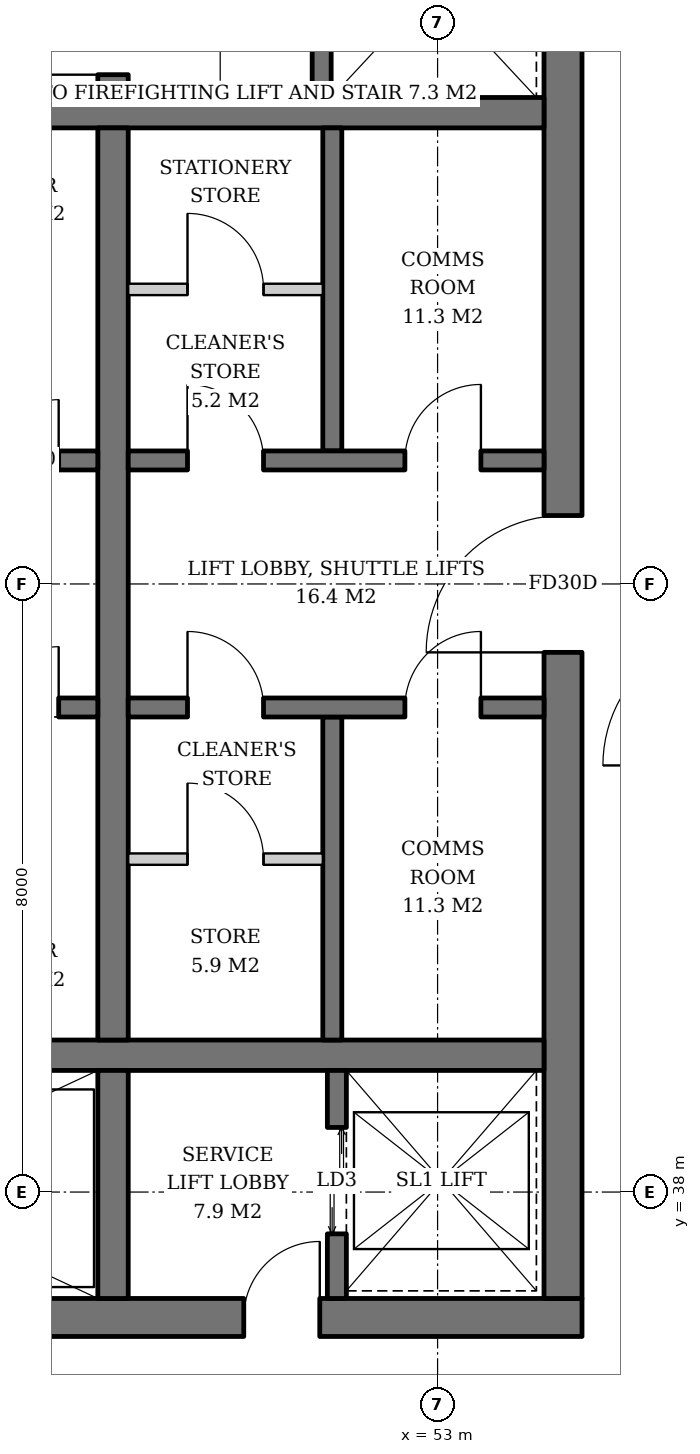
"""IFC4 building model, lengths in metres.
Left out: names, types, materials, properties, quantities, classifications, styles, units other than length and angle.
Written with IfcOpenShell. Run it as: python <this file> out.ifc"""

import sys

from ifc_helpers import new_model, si_unit, direction, frame, frame_2d, origin, place, context, subcontext, project, spatial, rectangle, extrude, element, fill, save


model = new_model("IFC4")
c1 = context("Model", 3, precision=1e-05, world=origin(), true_north=direction((0.0, 1.0)))
c2 = subcontext(c1, "Body", "Model", "MODEL_VIEW")
j1 = project(units=[si_unit("LENGTHUNIT", "METRE"), si_unit("PLANEANGLEUNIT", "RADIAN")], contexts=[c1])
p1 = place(None, origin())
s1 = spatial("IfcSite", under=j1, at=p1, CompositionType="ELEMENT")
p2 = place(p1, origin())
s2 = spatial("IfcBuilding", under=s1, at=p2, CompositionType="ELEMENT")
p3 = place(p2, frame((0.0, 0.0, 283.2)))
s3 = spatial("IfcBuildingStorey", under=s2, at=p3, CompositionType="ELEMENT", Elevation=283.2)
p4 = place(p3, frame((35.1, 36.35, 0.0), z_axis=(0.0, 0.0, 1.0), x_axis=(1.0, 0.0, 0.0)))
e1 = element("IfcWall", 1, at=p4, inside=s3, PredefinedType="SHEAR", context=c2, shape_type="SweptSolid", body=[
    extrude(rectangle(XDim=19.8, YDim=0.5, at=frame_2d((9.9, 0.0))), origin(), (0.0, 0.0, 1.0), 3.8),
])
p5 = place(p4, frame((3.9, 0.0, 0.0)))
e2 = element("IfcOpeningElement", 2, at=p5, cuts=e1, PredefinedType="OPENING", context=c2, shape_type="SweptSolid", body=[
    extrude(rectangle(XDim=1.0, YDim=2.1, at=frame_2d((0.5, 1.05))), frame((0.0, 0.26, 0.0), z_axis=(0.0, -1.0, 0.0), x_axis=(1.0, 0.0, 0.0)), (0.0, 0.0, 1.0), 0.52),
])
p6 = place(p4, frame((15.35, 0.0, 0.0)))
e3 = element("IfcOpeningElement", 3, at=p6, cuts=e1, PredefinedType="OPENING", context=c2, shape_type="SweptSolid", body=[
    extrude(rectangle(XDim=1.0, YDim=2.1, at=frame_2d((0.5, 1.05))), frame((0.0, 0.26, 0.0), z_axis=(0.0, -1.0, 0.0), x_axis=(1.0, 0.0, 0.0)), (0.0, 0.0, 1.0), 0.52),
])
p7 = place(p3, frame((54.65, 36.6, 0.0), z_axis=(0.0, 0.0, 1.0), x_axis=(0.0, 1.0, 0.0)))
e4 = element("IfcWall", 4, at=p7, inside=s3, PredefinedType="SHEAR", context=c2, shape_type="SweptSolid", body=[
    extrude(rectangle(XDim=18.8, YDim=0.5, at=frame_2d((9.4, 0.0))), origin(), (0.0, 0.0, 1.0), 3.8),
])
p8 = place(p7, frame((8.5, 0.0, 0.0)))
e5 = element("IfcOpeningElement", 5, at=p8, cuts=e4, PredefinedType="OPENING", context=c2, shape_type="SweptSolid", body=[
    extrude(rectangle(XDim=1.8, YDim=2.4, at=frame_2d((0.9, 1.2))), frame((0.0, 0.26, 0.0), z_axis=(0.0, -1.0, 0.0), x_axis=(1.0, 0.0, 0.0)), (0.0, 0.0, 1.0), 0.52),
])
for number, where, z_axis, x_axis in (
    (6, (35.6, 39.8, 0.0), (0.0, 0.0, 1.0), (1.0, 0.0, 0.0)),
    (7, (35.6, 52.2, 0.0), (0.0, 0.0, 1.0), (1.0, 0.0, 0.0)),
):
    element("IfcWall", number, at=place(p3, frame(where, z_axis=z_axis, x_axis=x_axis)), inside=s3, PredefinedType="SHEAR", context=c2, shape_type="SweptSolid", body=[
        extrude(rectangle(XDim=18.8, YDim=0.4, at=frame_2d((9.4, 0.0))), origin(), (0.0, 0.0, 1.0), 3.8),
    ])
p9 = place(p3, frame((48.73, 36.6, 0.0), z_axis=(0.0, 0.0, 1.0), x_axis=(0.0, 1.0, 0.0)))
e8 = element("IfcWall", 8, at=p9, inside=s3, PredefinedType="SHEAR", context=c2, shape_type="SweptSolid", body=[
    extrude(rectangle(XDim=3.0, YDim=0.4, at=frame_2d((1.5, 0.0))), origin(), (0.0, 0.0, 1.0), 3.8),
])
p10 = place(p3, frame((48.73, 40.0, 0.0), z_axis=(0.0, 0.0, 1.0), x_axis=(0.0, 1.0, 0.0)))
e9 = element("IfcWall", 9, at=p10, inside=s3, PredefinedType="SHEAR", context=c2, shape_type="SweptSolid", body=[
    extrude(rectangle(XDim=12.0, YDim=0.4, at=frame_2d((6.0, 0.0))), origin(), (0.0, 0.0, 1.0), 3.8),
])
p11 = place(p3, frame((48.73, 52.4, 0.0), z_axis=(0.0, 0.0, 1.0), x_axis=(0.0, 1.0, 0.0)))
e10 = element("IfcWall", 10, at=p11, inside=s3, PredefinedType="SHEAR", context=c2, shape_type="SweptSolid", body=[
    extrude(rectangle(XDim=3.0, YDim=0.4, at=frame_2d((1.5, 0.0))), origin(), (0.0, 0.0, 1.0), 3.8),
])
p12 = place(p11, frame((0.3, 0.0, 0.0)))
e11 = element("IfcOpeningElement", 11, at=p12, cuts=e10, PredefinedType="OPENING", context=c2, shape_type="SweptSolid", body=[
    extrude(rectangle(XDim=1.0, YDim=2.1, at=frame_2d((0.5, 1.05))), frame((0.0, 0.21, 0.0), z_axis=(0.0, -1.0, 0.0), x_axis=(1.0, 0.0, 0.0)), (0.0, 0.0, 1.0), 0.42),
])
p13 = place(p3, frame((51.675, 36.6, 0.0), z_axis=(0.0, 0.0, 1.0), x_axis=(0.0, 1.0, 0.0)))
e12 = element("IfcWall", 12, at=p13, inside=s3, PredefinedType="SHEAR", context=c2, shape_type="SweptSolid", body=[
    extrude(rectangle(XDim=3.0, YDim=0.25, at=frame_2d((1.5, 0.0))), origin(), (0.0, 0.0, 1.0), 3.8),
])
p14 = place(p13, frame((0.85, 0.0, 0.0)))
e13 = element("IfcOpeningElement", 13, at=p14, cuts=e12, PredefinedType="OPENING", context=c2, shape_type="SweptSolid", body=[
    extrude(rectangle(XDim=1.4, YDim=2.4, at=frame_2d((0.7, 1.2))), frame((0.0, 0.135, 0.0), z_axis=(0.0, -1.0, 0.0), x_axis=(1.0, 0.0, 0.0)), (0.0, 0.0, 1.0), 0.27),
])
p15 = place(p3, frame((51.475, 52.4, 0.0), z_axis=(0.0, 0.0, 1.0), x_axis=(0.0, 1.0, 0.0)))
e14 = element("IfcWall", 14, at=p15, inside=s3, PredefinedType="SHEAR", context=c2, shape_type="SweptSolid", body=[
    extrude(rectangle(XDim=3.0, YDim=0.25, at=frame_2d((1.5, 0.0))), origin(), (0.0, 0.0, 1.0), 3.8),
])
p16 = place(p15, frame((0.8, 0.0, 0.0)))
e15 = element("IfcOpeningElement", 15, at=p16, cuts=e14, PredefinedType="OPENING", context=c2, shape_type="SweptSolid", body=[
    extrude(rectangle(XDim=1.3, YDim=2.2, at=frame_2d((0.65, 1.1))), frame((0.0, 0.135, 0.0), z_axis=(0.0, -1.0, 0.0), x_axis=(1.0, 0.0, 0.0)), (0.0, 0.0, 1.0), 0.27),
])
p17 = place(p3, frame((35.6, 47.625, 0.0), z_axis=(0.0, 0.0, 1.0), x_axis=(1.0, 0.0, 0.0)))
e16 = element("IfcWall", 16, at=p17, inside=s3, PredefinedType="SHEAR", context=c2, shape_type="SweptSolid", body=[
    extrude(rectangle(XDim=12.93, YDim=0.25, at=frame_2d((6.465, 0.0))), origin(), (0.0, 0.0, 1.0), 3.8),
])
p18 = place(p17, frame((0.75, 0.0, 0.0)))
e17 = element("IfcOpeningElement", 17, at=p18, cuts=e16, PredefinedType="OPENING", context=c2, shape_type="SweptSolid", body=[
    extrude(rectangle(XDim=1.1, YDim=2.2, at=frame_2d((0.55, 1.1))), frame((0.0, 0.135, 0.0), z_axis=(0.0, -1.0, 0.0), x_axis=(1.0, 0.0, 0.0)), (0.0, 0.0, 1.0), 0.27),
])
p19 = place(p17, frame((3.55, 0.0, 0.0)))
e18 = element("IfcOpeningElement", 18, at=p19, cuts=e16, PredefinedType="OPENING", context=c2, shape_type="SweptSolid", body=[
    extrude(rectangle(XDim=1.1, YDim=2.2, at=frame_2d((0.55, 1.1))), frame((0.0, 0.135, 0.0), z_axis=(0.0, -1.0, 0.0), x_axis=(1.0, 0.0, 0.0)), (0.0, 0.0, 1.0), 0.27),
])
p20 = place(p17, frame((6.3, 0.0, 0.0)))
e19 = element("IfcOpeningElement", 19, at=p20, cuts=e16, PredefinedType="OPENING", context=c2, shape_type="SweptSolid", body=[
    extrude(rectangle(XDim=1.1, YDim=2.2, at=frame_2d((0.55, 1.1))), frame((0.0, 0.135, 0.0), z_axis=(0.0, -1.0, 0.0), x_axis=(1.0, 0.0, 0.0)), (0.0, 0.0, 1.0), 0.27),
])
p21 = place(p17, frame((9.1, 0.0, 0.0)))
e20 = element("IfcOpeningElement", 20, at=p21, cuts=e16, PredefinedType="OPENING", context=c2, shape_type="SweptSolid", body=[
    extrude(rectangle(XDim=1.0, YDim=2.1, at=frame_2d((0.5, 1.05))), frame((0.0, 0.135, 0.0), z_axis=(0.0, -1.0, 0.0), x_axis=(1.0, 0.0, 0.0)), (0.0, 0.0, 1.0), 0.27),
])
p22 = place(p17, frame((11.615, 0.0, 0.0)))
e21 = element("IfcOpeningElement", 21, at=p22, cuts=e16, PredefinedType="OPENING", context=c2, shape_type="SweptSolid", body=[
    extrude(rectangle(XDim=0.8, YDim=2.0, at=frame_2d((0.4, 1.0))), frame((0.0, 0.135, 0.0), z_axis=(0.0, -1.0, 0.0), x_axis=(1.0, 0.0, 0.0)), (0.0, 0.0, 1.0), 0.27),
])
p23 = place(p3, frame((35.6, 44.375, 0.0), z_axis=(0.0, 0.0, 1.0), x_axis=(1.0, 0.0, 0.0)))
e22 = element("IfcWall", 22, at=p23, inside=s3, PredefinedType="SHEAR", context=c2, shape_type="SweptSolid", body=[
    extrude(rectangle(XDim=12.93, YDim=0.25, at=frame_2d((6.465, 0.0))), origin(), (0.0, 0.0, 1.0), 3.8),
])
p24 = place(p23, frame((0.75, 0.0, 0.0)))
e23 = element("IfcOpeningElement", 23, at=p24, cuts=e22, PredefinedType="OPENING", context=c2, shape_type="SweptSolid", body=[
    extrude(rectangle(XDim=1.1, YDim=2.2, at=frame_2d((0.55, 1.1))), frame((0.0, 0.135, 0.0), z_axis=(0.0, -1.0, 0.0), x_axis=(1.0, 0.0, 0.0)), (0.0, 0.0, 1.0), 0.27),
])
p25 = place(p23, frame((3.55, 0.0, 0.0)))
e24 = element("IfcOpeningElement", 24, at=p25, cuts=e22, PredefinedType="OPENING", context=c2, shape_type="SweptSolid", body=[
    extrude(rectangle(XDim=1.1, YDim=2.2, at=frame_2d((0.55, 1.1))), frame((0.0, 0.135, 0.0), z_axis=(0.0, -1.0, 0.0), x_axis=(1.0, 0.0, 0.0)), (0.0, 0.0, 1.0), 0.27),
])
p26 = place(p23, frame((6.3, 0.0, 0.0)))
e25 = element("IfcOpeningElement", 25, at=p26, cuts=e22, PredefinedType="OPENING", context=c2, shape_type="SweptSolid", body=[
    extrude(rectangle(XDim=1.1, YDim=2.2, at=frame_2d((0.55, 1.1))), frame((0.0, 0.135, 0.0), z_axis=(0.0, -1.0, 0.0), x_axis=(1.0, 0.0, 0.0)), (0.0, 0.0, 1.0), 0.27),
])
p27 = place(p23, frame((9.1, 0.0, 0.0)))
e26 = element("IfcOpeningElement", 26, at=p27, cuts=e22, PredefinedType="OPENING", context=c2, shape_type="SweptSolid", body=[
    extrude(rectangle(XDim=1.0, YDim=2.1, at=frame_2d((0.5, 1.05))), frame((0.0, 0.135, 0.0), z_axis=(0.0, -1.0, 0.0), x_axis=(1.0, 0.0, 0.0)), (0.0, 0.0, 1.0), 0.27),
])
p28 = place(p23, frame((11.615, 0.0, 0.0)))
e27 = element("IfcOpeningElement", 27, at=p28, cuts=e22, PredefinedType="OPENING", context=c2, shape_type="SweptSolid", body=[
    extrude(rectangle(XDim=0.8, YDim=2.0, at=frame_2d((0.4, 1.0))), frame((0.0, 0.135, 0.0), z_axis=(0.0, -1.0, 0.0), x_axis=(1.0, 0.0, 0.0)), (0.0, 0.0, 1.0), 0.27),
])
p29 = place(p3, frame((51.615, 47.75, 0.0), z_axis=(0.0, 0.0, 1.0), x_axis=(0.0, 1.0, 0.0)))
e28 = element("IfcWall", 28, at=p29, inside=s3, PredefinedType="SHEAR", context=c2, shape_type="SweptSolid", body=[
    extrude(rectangle(XDim=4.25, YDim=0.25, at=frame_2d((2.125, 0.0))), origin(), (0.0, 0.0, 1.0), 3.8),
])
p30 = place(p3, frame((48.93, 47.625, 0.0), z_axis=(0.0, 0.0, 1.0), x_axis=(1.0, 0.0, 0.0)))
e29 = element("IfcWall", 29, at=p30, inside=s3, PredefinedType="SHEAR", context=c2, shape_type="SweptSolid", body=[
    extrude(rectangle(XDim=5.47, YDim=0.25, at=frame_2d((2.735, 0.0))), origin(), (0.0, 0.0, 1.0), 3.8),
])
p31 = place(p30, frame((0.78, 0.0, 0.0)))
e30 = element("IfcOpeningElement", 30, at=p31, cuts=e29, PredefinedType="OPENING", context=c2, shape_type="SweptSolid", body=[
    extrude(rectangle(XDim=1.0, YDim=2.1, at=frame_2d((0.5, 1.05))), frame((0.0, 0.135, 0.0), z_axis=(0.0, -1.0, 0.0), x_axis=(1.0, 0.0, 0.0)), (0.0, 0.0, 1.0), 0.27),
])
p32 = place(p30, frame((3.64, 0.0, 0.0)))
e31 = element("IfcOpeningElement", 31, at=p32, cuts=e29, PredefinedType="OPENING", context=c2, shape_type="SweptSolid", body=[
    extrude(rectangle(XDim=1.0, YDim=2.1, at=frame_2d((0.5, 1.05))), frame((0.0, 0.135, 0.0), z_axis=(0.0, -1.0, 0.0), x_axis=(1.0, 0.0, 0.0)), (0.0, 0.0, 1.0), 0.27),
])
p33 = place(p3, frame((51.615, 44.25, 0.0), z_axis=(0.0, 0.0, 1.0), x_axis=(0.0, -1.0, 0.0)))
e32 = element("IfcWall", 32, at=p33, inside=s3, PredefinedType="SHEAR", context=c2, shape_type="SweptSolid", body=[
    extrude(rectangle(XDim=4.25, YDim=0.25, at=frame_2d((2.125, 0.0))), origin(), (0.0, 0.0, 1.0), 3.8),
])
p34 = place(p3, frame((48.93, 44.375, 0.0), z_axis=(0.0, 0.0, 1.0), x_axis=(1.0, 0.0, 0.0)))
e33 = element("IfcWall", 33, at=p34, inside=s3, PredefinedType="SHEAR", context=c2, shape_type="SweptSolid", body=[
    extrude(rectangle(XDim=5.47, YDim=0.25, at=frame_2d((2.735, 0.0))), origin(), (0.0, 0.0, 1.0), 3.8),
])
p35 = place(p34, frame((0.78, 0.0, 0.0)))
e34 = element("IfcOpeningElement", 34, at=p35, cuts=e33, PredefinedType="OPENING", context=c2, shape_type="SweptSolid", body=[
    extrude(rectangle(XDim=1.0, YDim=2.1, at=frame_2d((0.5, 1.05))), frame((0.0, 0.135, 0.0), z_axis=(0.0, -1.0, 0.0), x_axis=(1.0, 0.0, 0.0)), (0.0, 0.0, 1.0), 0.27),
])
p36 = place(p34, frame((3.64, 0.0, 0.0)))
e35 = element("IfcOpeningElement", 35, at=p36, cuts=e33, PredefinedType="OPENING", context=c2, shape_type="SweptSolid", body=[
    extrude(rectangle(XDim=1.0, YDim=2.1, at=frame_2d((0.5, 1.05))), frame((0.0, 0.135, 0.0), z_axis=(0.0, -1.0, 0.0), x_axis=(1.0, 0.0, 0.0)), (0.0, 0.0, 1.0), 0.27),
])
p37 = place(p3, frame((48.93, 49.875, 0.0), z_axis=(0.0, 0.0, 1.0), x_axis=(1.0, 0.0, 0.0)))
e36 = element("IfcWall", 36, at=p37, inside=s3, PredefinedType="SOLIDWALL", context=c2, shape_type="SweptSolid", body=[
    extrude(rectangle(XDim=2.56, YDim=0.15, at=frame_2d((1.28, 0.0))), origin(), (0.0, 0.0, 1.0), 3.6),
])
p38 = place(p37, frame((0.78, 0.0, 0.0)))
e37 = element("IfcOpeningElement", 37, at=p38, cuts=e36, PredefinedType="OPENING", context=c2, shape_type="SweptSolid", body=[
    extrude(rectangle(XDim=1.0, YDim=2.1, at=frame_2d((0.5, 1.05))), frame((0.0, 0.085, 0.0), z_axis=(0.0, -1.0, 0.0), x_axis=(1.0, 0.0, 0.0)), (0.0, 0.0, 1.0), 0.17),
])
p39 = place(p3, frame((48.93, 42.38, 0.0), z_axis=(0.0, 0.0, 1.0), x_axis=(1.0, 0.0, 0.0)))
e38 = element("IfcWall", 38, at=p39, inside=s3, PredefinedType="SOLIDWALL", context=c2, shape_type="SweptSolid", body=[
    extrude(rectangle(XDim=2.56, YDim=0.15, at=frame_2d((1.28, 0.0))), origin(), (0.0, 0.0, 1.0), 3.6),
])
p40 = place(p39, frame((0.78, 0.0, 0.0)))
e39 = element("IfcOpeningElement", 39, at=p40, cuts=e38, PredefinedType="OPENING", context=c2, shape_type="SweptSolid", body=[
    extrude(rectangle(XDim=1.0, YDim=2.1, at=frame_2d((0.5, 1.05))), frame((0.0, 0.085, 0.0), z_axis=(0.0, -1.0, 0.0), x_axis=(1.0, 0.0, 0.0)), (0.0, 0.0, 1.0), 0.17),
])
p41 = place(p14, origin())
e40 = element("IfcDoor", 40, at=p41, inside=s3, OperationType="DOUBLE_DOOR_SLIDING", PredefinedType="DOOR", context=c2, shape_type="SweptSolid", body=[
    extrude(rectangle(XDim=1.4, YDim=2.4, at=frame_2d((0.7, 1.2))), frame((0.0, 0.025, 0.0), z_axis=(0.0, -1.0, 0.0), x_axis=(1.0, 0.0, 0.0)), (0.0, 0.0, 1.0), 0.05),
])
fill(e13, e40)
p42 = place(p22, origin())
e41 = element("IfcDoor", 41, at=p42, inside=s3, OperationType="SINGLE_SWING_RIGHT", PredefinedType="DOOR", context=c2, shape_type="SweptSolid", body=[
    extrude(rectangle(XDim=0.8, YDim=2.0, at=frame_2d((0.4, 1.0))), frame((0.0, 0.025, 0.0), z_axis=(0.0, -1.0, 0.0), x_axis=(1.0, 0.0, 0.0)), (0.0, 0.0, 1.0), 0.05),
])
fill(e21, e41)
p43 = place(p28, origin())
e42 = element("IfcDoor", 42, at=p43, inside=s3, OperationType="SINGLE_SWING_RIGHT", PredefinedType="DOOR", context=c2, shape_type="SweptSolid", body=[
    extrude(rectangle(XDim=0.8, YDim=2.0, at=frame_2d((0.4, 1.0))), frame((0.0, 0.025, 0.0), z_axis=(0.0, -1.0, 0.0), x_axis=(1.0, 0.0, 0.0)), (0.0, 0.0, 1.0), 0.05),
])
fill(e27, e42)
p44 = place(p31, origin())
e43 = element("IfcDoor", 43, at=p44, inside=s3, OperationType="SINGLE_SWING_LEFT", PredefinedType="DOOR", context=c2, shape_type="SweptSolid", body=[
    extrude(rectangle(XDim=1.0, YDim=2.1, at=frame_2d((0.5, 1.05))), frame((0.0, 0.025, 0.0), z_axis=(0.0, -1.0, 0.0), x_axis=(1.0, 0.0, 0.0)), (0.0, 0.0, 1.0), 0.05),
])
fill(e30, e43)
p45 = place(p32, origin())
e44 = element("IfcDoor", 44, at=p45, inside=s3, OperationType="SINGLE_SWING_RIGHT", PredefinedType="DOOR", context=c2, shape_type="SweptSolid", body=[
    extrude(rectangle(XDim=1.0, YDim=2.1, at=frame_2d((0.5, 1.05))), frame((0.0, 0.025, 0.0), z_axis=(0.0, -1.0, 0.0), x_axis=(1.0, 0.0, 0.0)), (0.0, 0.0, 1.0), 0.05),
])
fill(e31, e44)
p46 = place(p35, origin())
e45 = element("IfcDoor", 45, at=p46, inside=s3, OperationType="SINGLE_SWING_LEFT", PredefinedType="DOOR", context=c2, shape_type="SweptSolid", body=[
    extrude(rectangle(XDim=1.0, YDim=2.1, at=frame_2d((0.5, 1.05))), frame((0.0, 0.025, 0.0), z_axis=(0.0, -1.0, 0.0), x_axis=(1.0, 0.0, 0.0)), (0.0, 0.0, 1.0), 0.05),
])
fill(e34, e45)
p47 = place(p36, origin())
e46 = element("IfcDoor", 46, at=p47, inside=s3, OperationType="SINGLE_SWING_RIGHT", PredefinedType="DOOR", context=c2, shape_type="SweptSolid", body=[
    extrude(rectangle(XDim=1.0, YDim=2.1, at=frame_2d((0.5, 1.05))), frame((0.0, 0.025, 0.0), z_axis=(0.0, -1.0, 0.0), x_axis=(1.0, 0.0, 0.0)), (0.0, 0.0, 1.0), 0.05),
])
fill(e35, e46)
p48 = place(p38, origin())
e47 = element("IfcDoor", 47, at=p48, inside=s3, OperationType="SINGLE_SWING_LEFT", PredefinedType="DOOR", context=c2, shape_type="SweptSolid", body=[
    extrude(rectangle(XDim=1.0, YDim=2.1, at=frame_2d((0.5, 1.05))), frame((0.0, 0.025, 0.0), z_axis=(0.0, -1.0, 0.0), x_axis=(1.0, 0.0, 0.0)), (0.0, 0.0, 1.0), 0.05),
])
fill(e37, e47)
p49 = place(p40, origin())
e48 = element("IfcDoor", 48, at=p49, inside=s3, OperationType="SINGLE_SWING_LEFT", PredefinedType="DOOR", context=c2, shape_type="SweptSolid", body=[
    extrude(rectangle(XDim=1.0, YDim=2.1, at=frame_2d((0.5, 1.05))), frame((0.0, 0.025, 0.0), z_axis=(0.0, -1.0, 0.0), x_axis=(1.0, 0.0, 0.0)), (0.0, 0.0, 1.0), 0.05),
])
fill(e39, e48)
p50 = place(p12, origin())
e49 = element("IfcDoor", 49, at=p50, inside=s3, OperationType="SINGLE_SWING_LEFT", PredefinedType="DOOR", context=c2, shape_type="SweptSolid", body=[
    extrude(rectangle(XDim=1.0, YDim=2.1, at=frame_2d((0.5, 1.05))), frame((0.0, 0.025, 0.0), z_axis=(0.0, -1.0, 0.0), x_axis=(1.0, 0.0, 0.0)), (0.0, 0.0, 1.0), 0.05),
])
fill(e11, e49)
p51 = place(p8, origin())
e50 = element("IfcDoor", 50, at=p51, inside=s3, OperationType="DOUBLE_DOOR_SINGLE_SWING", PredefinedType="DOOR", context=c2, shape_type="SweptSolid", body=[
    extrude(rectangle(XDim=1.8, YDim=2.4, at=frame_2d((0.9, 1.2))), frame((0.0, 0.025, 0.0), z_axis=(0.0, -1.0, 0.0), x_axis=(1.0, 0.0, 0.0)), (0.0, 0.0, 1.0), 0.05),
])
fill(e5, e50)
p52 = place(p6, origin())
e51 = element("IfcDoor", 51, at=p52, inside=s3, OperationType="SINGLE_SWING_RIGHT", PredefinedType="DOOR", context=c2, shape_type="SweptSolid", body=[
    extrude(rectangle(XDim=1.0, YDim=2.1, at=frame_2d((0.5, 1.05))), frame((0.0, 0.025, 0.0), z_axis=(0.0, -1.0, 0.0), x_axis=(1.0, 0.0, 0.0)), (0.0, 0.0, 1.0), 0.05),
])
fill(e3, e51)
save(model, sys.argv[1])
